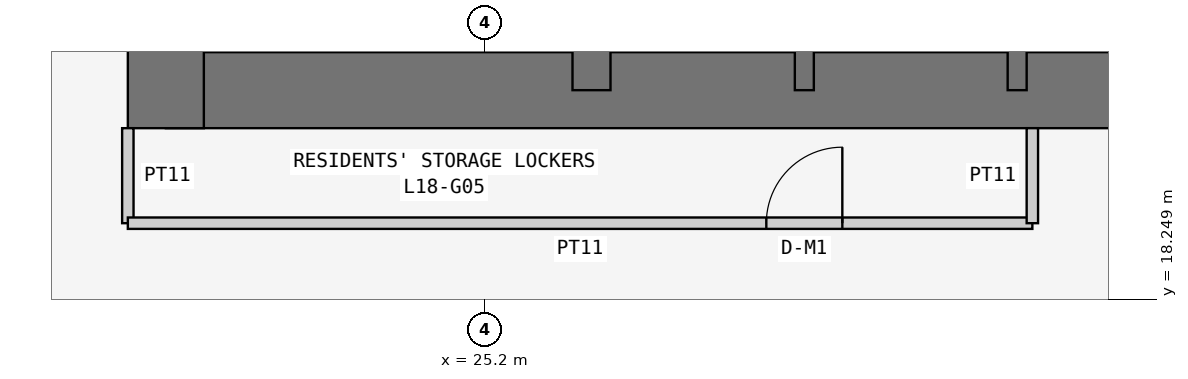
"""IFC4 building model, lengths in metres.
Left out: names, types, materials, properties, quantities, classifications, styles, units other than length and angle.
Written with IfcOpenShell. Run it as: python <this file> out.ifc"""

import sys

from ifc_helpers import new_model, si_unit, direction, frame, frame_2d, origin, place, context, subcontext, project, spatial, rectangle, extrude, element, fill, save


model = new_model("IFC4")
c1 = context("Model", 3, precision=1e-05, world=origin(), true_north=direction((0.0, 1.0)))
c2 = subcontext(c1, "Body", "Model", "MODEL_VIEW")
j1 = project(units=[si_unit("LENGTHUNIT", "METRE"), si_unit("PLANEANGLEUNIT", "RADIAN")], contexts=[c1])
p1 = place(None, origin())
s1 = spatial("IfcSite", under=j1, at=p1, CompositionType="ELEMENT")
p2 = place(p1, origin())
s2 = spatial("IfcBuilding", under=s1, at=p2, CompositionType="ELEMENT")
p3 = place(p2, frame((0.0, 0.0, 74.1)))
s3 = spatial("IfcBuildingStorey", under=s2, at=p3, CompositionType="ELEMENT", Elevation=74.1)
p4 = place(p3, frame((21.0, 21.0, 0.0), z_axis=(0.0, 0.0, 1.0), x_axis=(1.0, 0.0, 0.0)))
e1 = element("IfcWall", 1, at=p4, inside=s3, PredefinedType="SHEAR", context=c2, shape_type="SweptSolid", body=[
    extrude(rectangle(XDim=17.3, YDim=1.0, at=frame_2d((8.65, 0.0))), origin(), (0.0, 0.0, 1.0), 3.6),
])
p5 = place(p3, frame((21.0, 37.8, 0.0), z_axis=(0.0, 0.0, 1.0), x_axis=(0.0, -1.0, 0.0)))
e2 = element("IfcWall", 2, at=p5, inside=s3, PredefinedType="SHEAR", context=c2, shape_type="SweptSolid", body=[
    extrude(rectangle(XDim=17.3, YDim=1.0, at=frame_2d((8.65, 0.0))), origin(), (0.0, 0.0, 1.0), 3.6),
])
p6 = place(p5, frame((5.4, 0.0, 0.0)))
e3 = element("IfcOpeningElement", 3, at=p6, cuts=e2, PredefinedType="OPENING", context=c2, shape_type="SweptSolid", body=[
    extrude(rectangle(XDim=1.2, YDim=2.1, at=frame_2d((0.6, 1.05))), frame((0.0, 0.51, 0.0), z_axis=(0.0, -1.0, 0.0), x_axis=(1.0, 0.0, 0.0)), (0.0, 0.0, 1.0), 1.02),
])
p7 = place(p3, frame((26.6, 21.0, 0.0), z_axis=(0.0, 0.0, 1.0), x_axis=(0.0, 1.0, 0.0)))
e4 = element("IfcWall", 4, at=p7, inside=s3, PredefinedType="SHEAR", context=c2, shape_type="SweptSolid", body=[
    extrude(rectangle(XDim=16.8, YDim=0.5, at=frame_2d((8.4, 0.0))), origin(), (0.0, 0.0, 1.0), 3.6),
])
p8 = place(p7, frame((10.4, 0.0, 0.0)))
e5 = element("IfcOpeningElement", 5, at=p8, cuts=e4, PredefinedType="OPENING", context=c2, shape_type="SweptSolid", body=[
    extrude(rectangle(XDim=1.2, YDim=2.1, at=frame_2d((0.6, 1.05))), frame((0.0, 0.26, 0.0), z_axis=(0.0, -1.0, 0.0), x_axis=(1.0, 0.0, 0.0)), (0.0, 0.0, 1.0), 0.52),
])
for number, where, z_axis, x_axis in (
    (6, (29.4, 21.0, 0.0), (0.0, 0.0, 1.0), (0.0, 1.0, 0.0)),
    (7, (32.2, 21.0, 0.0), (0.0, 0.0, 1.0), (0.0, 1.0, 0.0)),
):
    element("IfcWall", number, at=place(p3, frame(where, z_axis=z_axis, x_axis=x_axis)), inside=s3, PredefinedType="SHEAR", context=c2, shape_type="SweptSolid", body=[
        extrude(rectangle(XDim=3.2, YDim=0.25, at=frame_2d((1.6, 0.0))), origin(), (0.0, 0.0, 1.0), 3.6),
    ])
p9 = place(p3, frame((20.5, 20.5, 0.0), z_axis=(0.0, 0.0, 1.0), x_axis=(0.0, -1.0, 0.0)))
e8 = element("IfcWall", 8, at=p9, inside=s3, PredefinedType="PARTITIONING", context=c2, shape_type="SweptSolid", body=[
    extrude(rectangle(XDim=1.25, YDim=0.15, at=frame_2d((0.625, 0.0))), origin(), (0.0, 0.0, 1.0), 3.45),
])
p10 = place(p3, frame((20.5, 19.25, 0.0), z_axis=(0.0, 0.0, 1.0), x_axis=(1.0, 0.0, 0.0)))
e9 = element("IfcWall", 9, at=p10, inside=s3, PredefinedType="PARTITIONING", context=c2, shape_type="SweptSolid", body=[
    extrude(rectangle(XDim=11.9, YDim=0.15, at=frame_2d((5.95, 0.0))), origin(), (0.0, 0.0, 1.0), 3.45),
])
p11 = place(p10, frame((8.4, 0.0, 0.0)))
e10 = element("IfcOpeningElement", 10, at=p11, cuts=e9, PredefinedType="OPENING", context=c2, shape_type="SweptSolid", body=[
    extrude(rectangle(XDim=1.0, YDim=2.1, at=frame_2d((0.5, 1.05))), frame((0.0, 0.085, 0.0), z_axis=(0.0, -1.0, 0.0), x_axis=(1.0, 0.0, 0.0)), (0.0, 0.0, 1.0), 0.17),
])
p12 = place(p3, frame((32.4, 19.25, 0.0), z_axis=(0.0, 0.0, 1.0), x_axis=(0.0, 1.0, 0.0)))
e11 = element("IfcWall", 11, at=p12, inside=s3, PredefinedType="PARTITIONING", context=c2, shape_type="SweptSolid", body=[
    extrude(rectangle(XDim=1.25, YDim=0.15, at=frame_2d((0.625, 0.0))), origin(), (0.0, 0.0, 1.0), 3.45),
])
p13 = place(p11, origin())
e12 = element("IfcDoor", 12, at=p13, inside=s3, OperationType="SINGLE_SWING_RIGHT", PredefinedType="DOOR", context=c2, shape_type="SweptSolid", body=[
    extrude(rectangle(XDim=1.0, YDim=2.1, at=frame_2d((0.5, 1.05))), frame((0.0, 0.025, 0.0), z_axis=(0.0, -1.0, 0.0), x_axis=(1.0, 0.0, 0.0)), (0.0, 0.0, 1.0), 0.05),
])
fill(e10, e12)
save(model, sys.argv[1])
